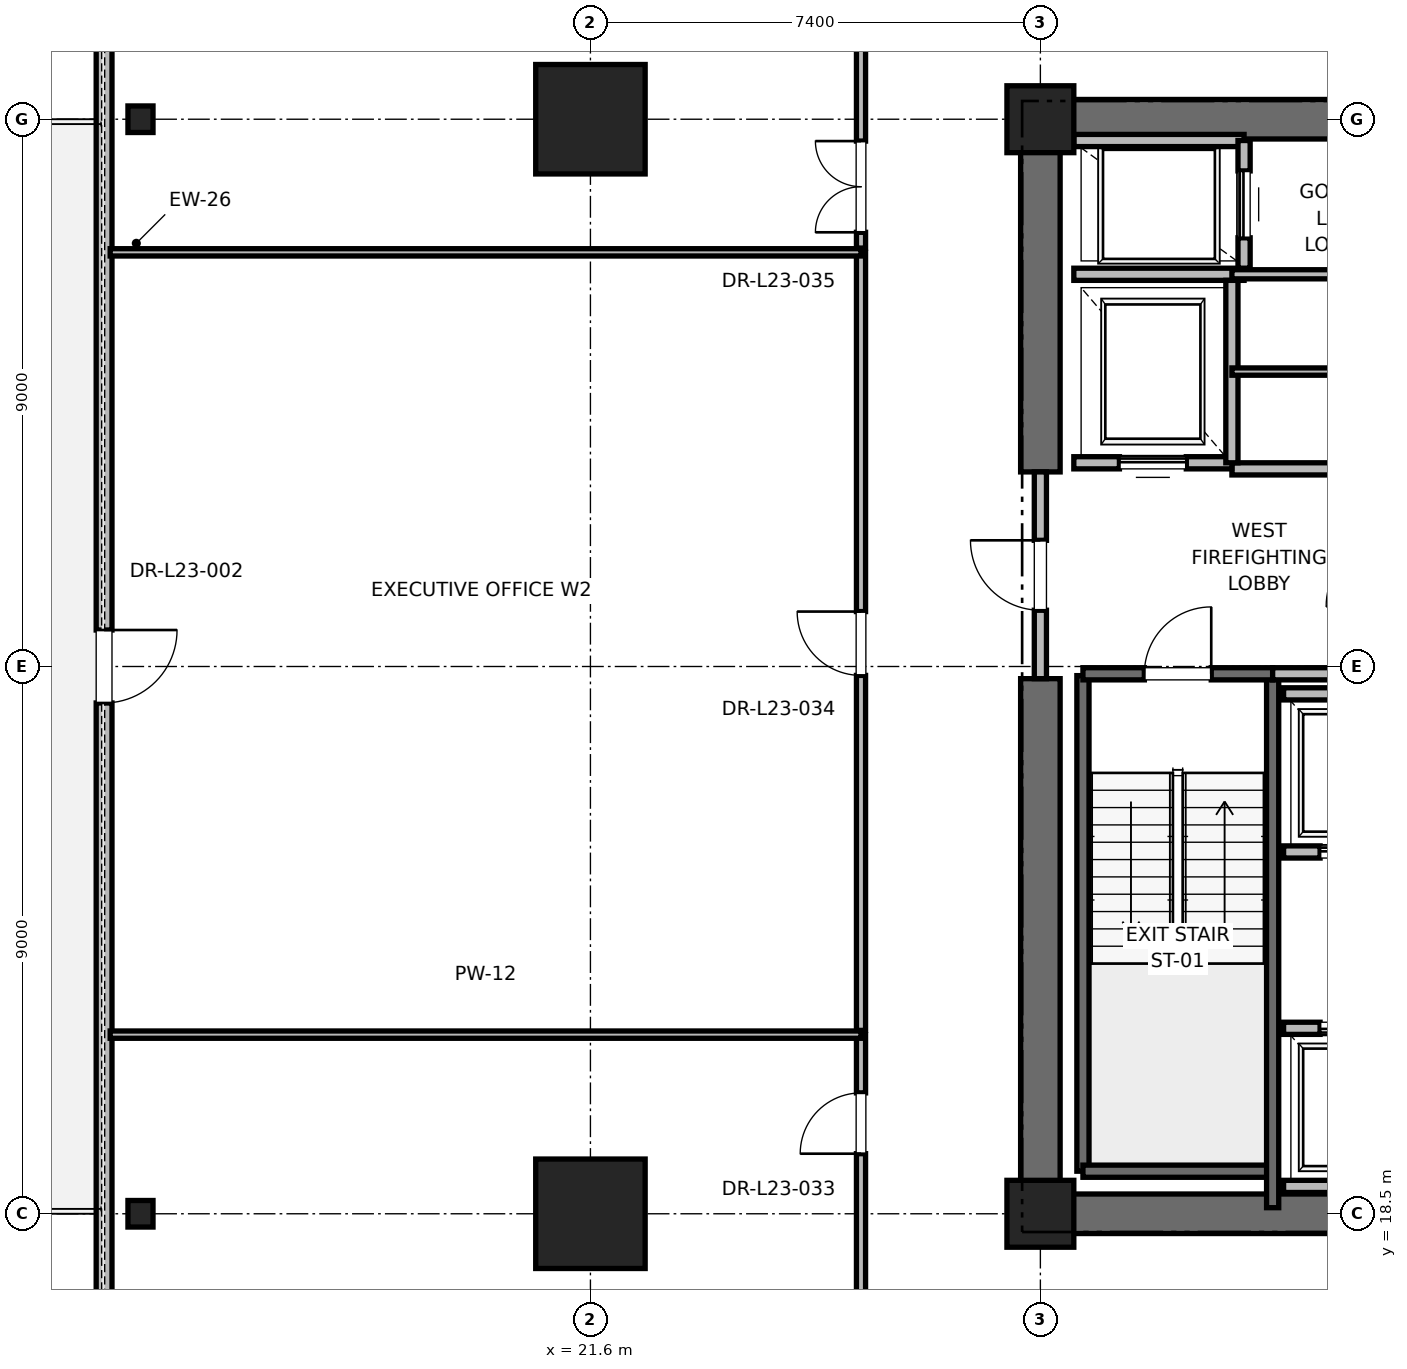
"""IFC4 building model, lengths in metres.
Left out: names, types, materials, properties, quantities, classifications, styles, units other than length and angle.
Written with IfcOpenShell. Run it as: python <this file> out.ifc"""

import sys

from ifc_helpers import new_model, si_unit, direction, frame, frame_2d, origin, origin_2d, place, context, subcontext, project, spatial, rectangle, i_section, extrude, element, fill, save


model = new_model("IFC4")
c1 = context("Model", 3, precision=1e-05, world=origin(), true_north=direction((0.0, 1.0)))
c2 = subcontext(c1, "Body", "Model", "MODEL_VIEW")
j1 = project(units=[si_unit("LENGTHUNIT", "METRE"), si_unit("PLANEANGLEUNIT", "RADIAN")], contexts=[c1])
p1 = place(None, origin())
s1 = spatial("IfcSite", under=j1, at=p1, CompositionType="ELEMENT")
p2 = place(p1, origin())
s2 = spatial("IfcBuilding", under=s1, at=p2, CompositionType="ELEMENT")
p3 = place(p2, frame((0.0, 0.0, 99.6)))
s3 = spatial("IfcBuildingStorey", under=s2, at=p3, CompositionType="ELEMENT", Elevation=99.6)
for number, where, z_axis, x_axis in (
    (1, (21.6, 18.5, 0.0), (0.0, 0.0, 1.0), (1.0, 0.0, 0.0)),
    (2, (21.6, 36.5, 0.0), (0.0, 0.0, 1.0), (1.0, 0.0, 0.0)),
):
    element("IfcColumn", number, at=place(p3, frame(where, z_axis=z_axis, x_axis=x_axis)), inside=s3, PredefinedType="COLUMN", context=c2, shape_type="SweptSolid", body=[
        extrude(rectangle(XDim=1.8, YDim=1.8, at=origin_2d()), origin(), (0.0, 0.0, 1.0), 4.0),
    ])
for number, where, z_axis, x_axis in (
    (3, (14.2, 18.5, 0.0), (0.0, 0.0, 1.0), (1.0, 0.0, 0.0)),
    (4, (14.2, 36.5, 0.0), (0.0, 0.0, 1.0), (1.0, 0.0, 0.0)),
):
    element("IfcColumn", number, at=place(p3, frame(where, z_axis=z_axis, x_axis=x_axis)), inside=s3, PredefinedType="COLUMN", context=c2, shape_type="SweptSolid", body=[
        extrude(i_section(OverallWidth=0.412, OverallDepth=0.437, WebThickness=0.036, FlangeThickness=0.058, FilletRadius=0.015, at=origin_2d()), origin(), (0.0, 0.0, 1.0), 4.0),
    ])
for number, where, z_axis, x_axis in (
    (5, (29.0, 18.5, 0.0), (0.0, 0.0, 1.0), (1.0, 0.0, 0.0)),
    (6, (29.0, 36.5, 0.0), (0.0, 0.0, 1.0), (1.0, 0.0, 0.0)),
):
    element("IfcColumn", number, at=place(p3, frame(where, z_axis=z_axis, x_axis=x_axis)), inside=s3, PredefinedType="PILASTER", context=c2, shape_type="SweptSolid", body=[
        extrude(rectangle(XDim=1.1, YDim=1.1, at=origin_2d()), origin(), (0.0, 0.0, 1.0), 4.0),
    ])
p4 = place(p3, frame((29.0, 18.5, 0.0), z_axis=(0.0, 0.0, 1.0), x_axis=(1.0, 0.0, 0.0)))
e7 = element("IfcWall", 7, at=p4, inside=s3, PredefinedType="SHEAR", context=c2, shape_type="SweptSolid", body=[
    extrude(rectangle(XDim=9.2, YDim=0.65, at=frame_2d((4.6, 0.0))), origin(), (0.0, 0.0, 1.0), 3.76),
])
p5 = place(p3, frame((29.0, 36.5, 0.0), z_axis=(0.0, 0.0, 1.0), x_axis=(1.0, 0.0, 0.0)))
e8 = element("IfcWall", 8, at=p5, inside=s3, PredefinedType="SHEAR", context=c2, shape_type="SweptSolid", body=[
    extrude(rectangle(XDim=5.8, YDim=0.65, at=frame_2d((2.9, 0.0))), origin(), (0.0, 0.0, 1.0), 3.76),
])
p6 = place(p3, frame((29.0, 18.5, 0.0), z_axis=(0.0, 0.0, 1.0), x_axis=(0.0, 1.0, 0.0)))
e9 = element("IfcWall", 9, at=p6, inside=s3, PredefinedType="SHEAR", context=c2, shape_type="SweptSolid", body=[
    extrude(rectangle(XDim=8.8, YDim=0.65, at=frame_2d((4.4, 0.0))), origin(), (0.0, 0.0, 1.0), 3.76),
])
p7 = place(p3, frame((29.0, 30.7, 0.0), z_axis=(0.0, 0.0, 1.0), x_axis=(0.0, 1.0, 0.0)))
e10 = element("IfcWall", 10, at=p7, inside=s3, PredefinedType="SHEAR", context=c2, shape_type="SweptSolid", body=[
    extrude(rectangle(XDim=5.8, YDim=0.65, at=frame_2d((2.9, 0.0))), origin(), (0.0, 0.0, 1.0), 3.76),
])
p8 = place(p3, frame((13.601, 46.819, 0.0), z_axis=(0.0, 0.0, 1.0), x_axis=(0.0, -1.0, 0.0)))
e11 = element("IfcWall", 11, at=p8, inside=s3, PredefinedType="PARAPET", context=c2, shape_type="SweptSolid", body=[
    extrude(rectangle(XDim=38.638, YDim=0.26, at=frame_2d((19.319, 0.0))), origin(), (0.0, 0.0, 1.0), 3.273),
])
p9 = place(p8, frame((4.2, 0.0, 0.85)))
e12 = element("IfcOpeningElement", 12, at=p9, cuts=e11, PredefinedType="OPENING", context=c2, shape_type="SweptSolid", body=[
    extrude(rectangle(XDim=1.8, YDim=2.2, at=frame_2d((0.9, 1.1))), frame((0.0, 0.13, 0.0), z_axis=(0.0, -1.0, 0.0), x_axis=(1.0, 0.0, 0.0)), (0.0, 0.0, 1.0), 0.26),
])
p10 = place(p8, frame((18.719, 0.0, 0.0)))
e13 = element("IfcOpeningElement", 13, at=p10, cuts=e11, PredefinedType="OPENING", context=c2, shape_type="SweptSolid", body=[
    extrude(rectangle(XDim=1.2, YDim=2.2, at=frame_2d((0.6, 1.1))), frame((0.0, 0.13, 0.0), z_axis=(0.0, -1.0, 0.0), x_axis=(1.0, 0.0, 0.0)), (0.0, 0.0, 1.0), 0.26),
])
p11 = place(p8, frame((32.638, 0.0, 0.85)))
e14 = element("IfcOpeningElement", 14, at=p11, cuts=e11, PredefinedType="OPENING", context=c2, shape_type="SweptSolid", body=[
    extrude(rectangle(XDim=1.8, YDim=2.2, at=frame_2d((0.9, 1.1))), frame((0.0, 0.13, 0.0), z_axis=(0.0, -1.0, 0.0), x_axis=(1.0, 0.0, 0.0)), (0.0, 0.0, 1.0), 0.26),
])
p12 = place(p3, frame((29.7, 19.2, 0.0), z_axis=(0.0, 0.0, 1.0), x_axis=(0.0, 1.0, 0.0)))
e15 = element("IfcWall", 15, at=p12, inside=s3, PredefinedType="SOLIDWALL", context=c2, shape_type="SweptSolid", body=[
    extrude(rectangle(XDim=8.15, YDim=0.2, at=frame_2d((4.075, 0.0))), origin(), (0.0, 0.0, 1.0), 3.76),
])
p13 = place(p3, frame((29.7, 19.2, 0.0), z_axis=(0.0, 0.0, 1.0), x_axis=(1.0, 0.0, 0.0)))
e16 = element("IfcWall", 16, at=p13, inside=s3, PredefinedType="SOLIDWALL", context=c2, shape_type="SweptSolid", body=[
    extrude(rectangle(XDim=3.12, YDim=0.2, at=frame_2d((1.56, 0.0))), origin(), (0.0, 0.0, 1.0), 3.76),
])
p14 = place(p3, frame((32.82, 18.6, 0.0), z_axis=(0.0, 0.0, 1.0), x_axis=(0.0, 1.0, 0.0)))
e17 = element("IfcWall", 17, at=p14, inside=s3, PredefinedType="SOLIDWALL", context=c2, shape_type="SweptSolid", body=[
    extrude(rectangle(XDim=8.78, YDim=0.2, at=frame_2d((4.39, 0.0))), origin(), (0.0, 0.0, 1.0), 3.76),
])
p15 = place(p3, frame((29.7, 27.38, 0.0), z_axis=(0.0, 0.0, 1.0), x_axis=(1.0, 0.0, 0.0)))
e18 = element("IfcWall", 18, at=p15, inside=s3, PredefinedType="SOLIDWALL", context=c2, shape_type="SweptSolid", body=[
    extrude(rectangle(XDim=3.12, YDim=0.2, at=frame_2d((1.56, 0.0))), origin(), (0.0, 0.0, 1.0), 3.76),
])
p16 = place(p15, frame((1.01, 0.0, 0.0)))
e19 = element("IfcOpeningElement", 19, at=p16, cuts=e18, PredefinedType="OPENING", context=c2, shape_type="SweptSolid", body=[
    extrude(rectangle(XDim=1.1, YDim=2.15, at=frame_2d((0.55, 1.075))), frame((0.0, 0.1, 0.0), z_axis=(0.0, -1.0, 0.0), x_axis=(1.0, 0.0, 0.0)), (0.0, 0.0, 1.0), 0.2),
])
p17 = place(p3, frame((29.0, 27.3, 0.0), z_axis=(0.0, 0.0, 1.0), x_axis=(0.0, 1.0, 0.0)))
e20 = element("IfcWall", 20, at=p17, inside=s3, PredefinedType="PARTITIONING", context=c2, shape_type="SweptSolid", body=[
    extrude(rectangle(XDim=3.4, YDim=0.2, at=frame_2d((1.7, 0.0))), origin(), (0.0, 0.0, 1.0), 2.54),
])
p18 = place(p17, frame((1.125, 0.0, 0.0)))
e21 = element("IfcOpeningElement", 21, at=p18, cuts=e20, PredefinedType="OPENING", context=c2, shape_type="SweptSolid", body=[
    extrude(rectangle(XDim=1.15, YDim=2.2, at=frame_2d((0.575, 1.1))), frame((0.0, 0.1, 0.0), z_axis=(0.0, -1.0, 0.0), x_axis=(1.0, 0.0, 0.0)), (0.0, 0.0, 1.0), 0.2),
])
p19 = place(p3, frame((32.82, 27.38, 0.0), z_axis=(0.0, 0.0, 1.0), x_axis=(1.0, 0.0, 0.0)))
e22 = element("IfcWall", 22, at=p19, inside=s3, PredefinedType="PARTITIONING", context=c2, shape_type="SweptSolid", body=[
    extrude(rectangle(XDim=5.62, YDim=0.2, at=frame_2d((2.81, 0.0))), origin(), (0.0, 0.0, 1.0), 3.76),
])
p20 = place(p3, frame((32.15, 30.75, 0.0), z_axis=(0.0, 0.0, 1.0), x_axis=(1.0, 0.0, 0.0)))
e23 = element("IfcWall", 23, at=p20, inside=s3, PredefinedType="PARTITIONING", context=c2, shape_type="SweptSolid", body=[
    extrude(rectangle(XDim=3.13, YDim=0.2, at=frame_2d((1.565, 0.0))), origin(), (0.0, 0.0, 1.0), 3.76),
])
p21 = place(p3, frame((29.55, 30.85, 0.0), z_axis=(0.0, 0.0, 1.0), x_axis=(1.0, 0.0, 0.0)))
e24 = element("IfcWall", 24, at=p21, inside=s3, PredefinedType="SOLIDWALL", context=c2, shape_type="SweptSolid", body=[
    extrude(rectangle(XDim=2.6, YDim=0.2, at=frame_2d((1.3, 0.0))), origin(), (0.0, 0.0, 1.0), 2.54),
])
p22 = place(p21, frame((0.75, 0.0, 0.0)))
e25 = element("IfcOpeningElement", 25, at=p22, cuts=e24, PredefinedType="OPENING", context=c2, shape_type="SweptSolid", body=[
    extrude(rectangle(XDim=1.1, YDim=2.2, at=frame_2d((0.55, 1.1))), frame((0.0, 0.1, 0.0), z_axis=(0.0, -1.0, 0.0), x_axis=(1.0, 0.0, 0.0)), (0.0, 0.0, 1.0), 0.2),
])
p23 = place(p3, frame((29.55, 33.95, 0.0), z_axis=(0.0, 0.0, 1.0), x_axis=(1.0, 0.0, 0.0)))
e26 = element("IfcWall", 26, at=p23, inside=s3, PredefinedType="SOLIDWALL", context=c2, shape_type="SweptSolid", body=[
    extrude(rectangle(XDim=2.8, YDim=0.2, at=frame_2d((1.4, 0.0))), origin(), (0.0, 0.0, 1.0), 3.76),
])
p24 = place(p3, frame((32.15, 30.85, 0.0), z_axis=(0.0, 0.0, 1.0), x_axis=(0.0, 1.0, 0.0)))
e27 = element("IfcWall", 27, at=p24, inside=s3, PredefinedType="SOLIDWALL", context=c2, shape_type="SweptSolid", body=[
    extrude(rectangle(XDim=3.0, YDim=0.2, at=frame_2d((1.5, 0.0))), origin(), (0.0, 0.0, 1.0), 3.76),
])
p25 = place(p3, frame((32.35, 36.15, 0.0), z_axis=(0.0, 0.0, 1.0), x_axis=(-1.0, 0.0, 0.0)))
e28 = element("IfcWall", 28, at=p25, inside=s3, PredefinedType="SOLIDWALL", context=c2, shape_type="SweptSolid", body=[
    extrude(rectangle(XDim=2.8, YDim=0.2, at=frame_2d((1.4, 0.0))), origin(), (0.0, 0.0, 1.0), 2.889),
])
p26 = place(p3, frame((32.35, 34.05, 0.0), z_axis=(0.0, 0.0, 1.0), x_axis=(0.0, 1.0, 0.0)))
e29 = element("IfcWall", 29, at=p26, inside=s3, PredefinedType="SOLIDWALL", context=c2, shape_type="SweptSolid", body=[
    extrude(rectangle(XDim=2.1, YDim=0.2, at=frame_2d((1.05, 0.0))), origin(), (0.0, 0.0, 1.0), 3.76),
])
p27 = place(p26, frame((0.5, 0.0, 0.0)))
e30 = element("IfcOpeningElement", 30, at=p27, cuts=e29, PredefinedType="OPENING", context=c2, shape_type="SweptSolid", body=[
    extrude(rectangle(XDim=1.1, YDim=2.2, at=frame_2d((0.55, 1.1))), frame((0.0, 0.1, 0.0), z_axis=(0.0, -1.0, 0.0), x_axis=(1.0, 0.0, 0.0)), (0.0, 0.0, 1.0), 0.2),
])
p28 = place(p3, frame((33.0, 18.95, 0.0), z_axis=(0.0, 0.0, 1.0), x_axis=(1.0, 0.0, 0.0)))
e31 = element("IfcWall", 31, at=p28, inside=s3, PredefinedType="SOLIDWALL", context=c2, shape_type="SweptSolid", body=[
    extrude(rectangle(XDim=2.3, YDim=0.2, at=frame_2d((1.15, 0.0))), origin(), (0.0, 0.0, 1.0), 3.76),
])
p29 = place(p3, frame((35.3, 21.55, 0.0), z_axis=(0.0, 0.0, 1.0), x_axis=(-1.0, 0.0, 0.0)))
e32 = element("IfcWall", 32, at=p29, inside=s3, PredefinedType="SOLIDWALL", context=c2, shape_type="SweptSolid", body=[
    extrude(rectangle(XDim=2.3, YDim=0.2, at=frame_2d((1.15, 0.0))), origin(), (0.0, 0.0, 1.0), 3.76),
])
p30 = place(p29, frame((0.6, 0.0, 0.0)))
e33 = element("IfcOpeningElement", 33, at=p30, cuts=e32, PredefinedType="OPENING", context=c2, shape_type="SweptSolid", body=[
    extrude(rectangle(XDim=1.1, YDim=2.2, at=frame_2d((0.55, 1.1))), frame((0.0, 0.1, 0.0), z_axis=(0.0, -1.0, 0.0), x_axis=(1.0, 0.0, 0.0)), (0.0, 0.0, 1.0), 0.2),
])
p31 = place(p3, frame((33.0, 24.45, 0.0), z_axis=(0.0, 0.0, 1.0), x_axis=(1.0, 0.0, 0.0)))
e34 = element("IfcWall", 34, at=p31, inside=s3, PredefinedType="SOLIDWALL", context=c2, shape_type="SweptSolid", body=[
    extrude(rectangle(XDim=2.3, YDim=0.2, at=frame_2d((1.15, 0.0))), origin(), (0.0, 0.0, 1.0), 3.76),
])
p32 = place(p31, frame((0.6, 0.0, 0.0)))
e35 = element("IfcOpeningElement", 35, at=p32, cuts=e34, PredefinedType="OPENING", context=c2, shape_type="SweptSolid", body=[
    extrude(rectangle(XDim=1.1, YDim=2.2, at=frame_2d((0.55, 1.1))), frame((0.0, 0.1, 0.0), z_axis=(0.0, -1.0, 0.0), x_axis=(1.0, 0.0, 0.0)), (0.0, 0.0, 1.0), 0.2),
])
p33 = place(p3, frame((35.3, 27.05, 0.0), z_axis=(0.0, 0.0, 1.0), x_axis=(-1.0, 0.0, 0.0)))
e36 = element("IfcWall", 36, at=p33, inside=s3, PredefinedType="SOLIDWALL", context=c2, shape_type="SweptSolid", body=[
    extrude(rectangle(XDim=2.3, YDim=0.2, at=frame_2d((1.15, 0.0))), origin(), (0.0, 0.0, 1.0), 3.76),
])
p34 = place(p3, frame((32.15, 33.95, 0.0), z_axis=(0.0, 0.0, 1.0), x_axis=(1.0, 0.0, 0.0)))
e37 = element("IfcWall", 37, at=p34, inside=s3, PredefinedType="PARTITIONING", context=c2, shape_type="SweptSolid", body=[
    extrude(rectangle(XDim=3.13, YDim=0.15, at=frame_2d((1.565, 0.0))), origin(), (0.0, 0.0, 1.0), 2.85),
])
p35 = place(p3, frame((32.15, 32.35, 0.0), z_axis=(0.0, 0.0, 1.0), x_axis=(1.0, 0.0, 0.0)))
e38 = element("IfcWall", 38, at=p35, inside=s3, PredefinedType="PARTITIONING", context=c2, shape_type="SweptSolid", body=[
    extrude(rectangle(XDim=3.13, YDim=0.12, at=frame_2d((1.565, 0.0))), origin(), (0.0, 0.0, 1.0), 2.85),
])
p36 = place(p3, frame((26.05, 8.581, 0.0), z_axis=(0.0, 0.0, 1.0), x_axis=(0.0, 1.0, 0.0)))
e39 = element("IfcWall", 39, at=p36, inside=s3, PredefinedType="PARTITIONING", context=c2, shape_type="SweptSolid", body=[
    extrude(rectangle(XDim=12.865, YDim=0.15, at=frame_2d((6.432, 0.0))), origin(), (0.0, 0.0, 1.0), 2.85),
])
p37 = place(p36, frame((10.907, 0.0, 0.0)))
e40 = element("IfcOpeningElement", 40, at=p37, cuts=e39, PredefinedType="OPENING", context=c2, shape_type="SweptSolid", body=[
    extrude(rectangle(XDim=1.0, YDim=2.15, at=frame_2d((0.5, 1.075))), frame((0.0, 0.075, 0.0), z_axis=(0.0, -1.0, 0.0), x_axis=(1.0, 0.0, 0.0)), (0.0, 0.0, 1.0), 0.15),
])
p38 = place(p3, frame((13.701, 21.446, 0.0), z_axis=(0.0, 0.0, 1.0), x_axis=(1.0, 0.0, 0.0)))
e41 = element("IfcWall", 41, at=p38, inside=s3, PredefinedType="PARTITIONING", context=c2, shape_type="SweptSolid", body=[
    extrude(rectangle(XDim=12.349, YDim=0.12, at=frame_2d((6.174, 0.0))), origin(), (0.0, 0.0, 1.0), 2.85),
])
p39 = place(p3, frame((26.05, 21.516, 0.0), z_axis=(0.0, 0.0, 1.0), x_axis=(0.0, 1.0, 0.0)))
e42 = element("IfcWall", 42, at=p39, inside=s3, PredefinedType="PARTITIONING", context=c2, shape_type="SweptSolid", body=[
    extrude(rectangle(XDim=12.795, YDim=0.15, at=frame_2d((6.397, 0.0))), origin(), (0.0, 0.0, 1.0), 2.85),
])
p40 = place(p39, frame((5.837, 0.0, 0.0)))
e43 = element("IfcOpeningElement", 43, at=p40, cuts=e42, PredefinedType="OPENING", context=c2, shape_type="SweptSolid", body=[
    extrude(rectangle(XDim=1.05, YDim=2.2, at=frame_2d((0.525, 1.1))), frame((0.0, 0.075, 0.0), z_axis=(0.0, -1.0, 0.0), x_axis=(1.0, 0.0, 0.0)), (0.0, 0.0, 1.0), 0.15),
])
p41 = place(p3, frame((13.701, 34.311, 0.0), z_axis=(0.0, 0.0, 1.0), x_axis=(1.0, 0.0, 0.0)))
e44 = element("IfcWall", 44, at=p41, inside=s3, PredefinedType="PARTITIONING", context=c2, shape_type="SweptSolid", body=[
    extrude(rectangle(XDim=12.349, YDim=0.12, at=frame_2d((6.174, 0.0))), origin(), (0.0, 0.0, 1.0), 2.85),
])
p42 = place(p3, frame((26.05, 34.381, 0.0), z_axis=(0.0, 0.0, 1.0), x_axis=(0.0, 1.0, 0.0)))
e45 = element("IfcWall", 45, at=p42, inside=s3, PredefinedType="PARTITIONING", context=c2, shape_type="SweptSolid", body=[
    extrude(rectangle(XDim=12.038, YDim=0.15, at=frame_2d((6.019, 0.0))), origin(), (0.0, 0.0, 1.0), 2.85),
])
p43 = place(p42, frame((0.26, 0.0, 0.0)))
e46 = element("IfcOpeningElement", 46, at=p43, cuts=e45, PredefinedType="OPENING", context=c2, shape_type="SweptSolid", body=[
    extrude(rectangle(XDim=1.5, YDim=2.25, at=frame_2d((0.75, 1.125))), frame((0.0, 0.075, 0.0), z_axis=(0.0, -1.0, 0.0), x_axis=(1.0, 0.0, 0.0)), (0.0, 0.0, 1.0), 0.15),
])
p44 = place(p10, origin())
e47 = element("IfcDoor", 47, at=p44, inside=s3, OperationType="SINGLE_SWING_LEFT", PredefinedType="DOOR", context=c2, shape_type="SweptSolid", body=[
    extrude(rectangle(XDim=1.2, YDim=2.2, at=frame_2d((0.6, 1.1))), frame((0.0, 0.025, 0.0), z_axis=(0.0, -1.0, 0.0), x_axis=(1.0, 0.0, 0.0)), (0.0, 0.0, 1.0), 0.05),
])
fill(e13, e47)
p45 = place(p16, origin())
e48 = element("IfcDoor", 48, at=p45, inside=s3, OperationType="SINGLE_SWING_RIGHT", PredefinedType="DOOR", context=c2, shape_type="SweptSolid", body=[
    extrude(rectangle(XDim=1.1, YDim=2.15, at=frame_2d((0.55, 1.075))), frame((0.0, 0.025, 0.0), z_axis=(0.0, -1.0, 0.0), x_axis=(1.0, 0.0, 0.0)), (0.0, 0.0, 1.0), 0.05),
])
fill(e19, e48)
p46 = place(p18, origin())
e49 = element("IfcDoor", 49, at=p46, inside=s3, OperationType="SINGLE_SWING_RIGHT", PredefinedType="DOOR", context=c2, shape_type="SweptSolid", body=[
    extrude(rectangle(XDim=1.15, YDim=2.2, at=frame_2d((0.575, 1.1))), frame((0.0, 0.025, 0.0), z_axis=(0.0, -1.0, 0.0), x_axis=(1.0, 0.0, 0.0)), (0.0, 0.0, 1.0), 0.05),
])
fill(e21, e49)
p47 = place(p22, origin())
e50 = element("IfcDoor", 50, at=p47, inside=s3, OperationType="SLIDING_TO_RIGHT", PredefinedType="DOOR", context=c2, shape_type="SweptSolid", body=[
    extrude(rectangle(XDim=1.1, YDim=2.2, at=frame_2d((0.55, 1.1))), frame((0.0, 0.025, 0.0), z_axis=(0.0, -1.0, 0.0), x_axis=(1.0, 0.0, 0.0)), (0.0, 0.0, 1.0), 0.05),
])
fill(e25, e50)
p48 = place(p27, origin())
e51 = element("IfcDoor", 51, at=p48, inside=s3, OperationType="SLIDING_TO_RIGHT", PredefinedType="DOOR", context=c2, shape_type="SweptSolid", body=[
    extrude(rectangle(XDim=1.1, YDim=2.2, at=frame_2d((0.55, 1.1))), frame((0.0, 0.025, 0.0), z_axis=(0.0, -1.0, 0.0), x_axis=(1.0, 0.0, 0.0)), (0.0, 0.0, 1.0), 0.05),
])
fill(e30, e51)
p49 = place(p30, origin())
e52 = element("IfcDoor", 52, at=p49, inside=s3, OperationType="SLIDING_TO_RIGHT", PredefinedType="DOOR", context=c2, shape_type="SweptSolid", body=[
    extrude(rectangle(XDim=1.1, YDim=2.2, at=frame_2d((0.55, 1.1))), frame((0.0, 0.025, 0.0), z_axis=(0.0, -1.0, 0.0), x_axis=(1.0, 0.0, 0.0)), (0.0, 0.0, 1.0), 0.05),
])
fill(e33, e52)
p50 = place(p32, origin())
e53 = element("IfcDoor", 53, at=p50, inside=s3, OperationType="SLIDING_TO_RIGHT", PredefinedType="DOOR", context=c2, shape_type="SweptSolid", body=[
    extrude(rectangle(XDim=1.1, YDim=2.2, at=frame_2d((0.55, 1.1))), frame((0.0, 0.025, 0.0), z_axis=(0.0, -1.0, 0.0), x_axis=(1.0, 0.0, 0.0)), (0.0, 0.0, 1.0), 0.05),
])
fill(e35, e53)
p51 = place(p37, origin())
e54 = element("IfcDoor", 54, at=p51, inside=s3, OperationType="SINGLE_SWING_LEFT", PredefinedType="DOOR", context=c2, shape_type="SweptSolid", body=[
    extrude(rectangle(XDim=1.0, YDim=2.15, at=frame_2d((0.5, 1.075))), frame((0.0, 0.025, 0.0), z_axis=(0.0, -1.0, 0.0), x_axis=(1.0, 0.0, 0.0)), (0.0, 0.0, 1.0), 0.05),
])
fill(e40, e54)
p52 = place(p40, origin())
e55 = element("IfcDoor", 55, at=p52, inside=s3, OperationType="SINGLE_SWING_RIGHT", PredefinedType="DOOR", context=c2, shape_type="SweptSolid", body=[
    extrude(rectangle(XDim=1.05, YDim=2.2, at=frame_2d((0.525, 1.1))), frame((0.0, 0.025, 0.0), z_axis=(0.0, -1.0, 0.0), x_axis=(1.0, 0.0, 0.0)), (0.0, 0.0, 1.0), 0.05),
])
fill(e43, e55)
p53 = place(p43, origin())
e56 = element("IfcDoor", 56, at=p53, inside=s3, OperationType="DOUBLE_DOOR_SINGLE_SWING", PredefinedType="DOOR", context=c2, shape_type="SweptSolid", body=[
    extrude(rectangle(XDim=1.5, YDim=2.25, at=frame_2d((0.75, 1.125))), frame((0.0, 0.025, 0.0), z_axis=(0.0, -1.0, 0.0), x_axis=(1.0, 0.0, 0.0)), (0.0, 0.0, 1.0), 0.05),
])
fill(e46, e56)
save(model, sys.argv[1])
